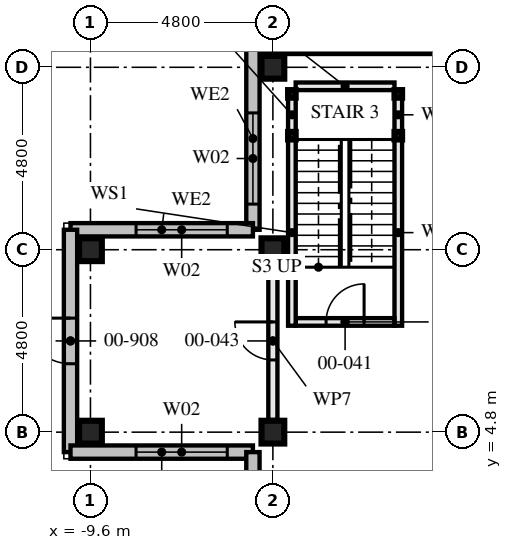
"""IFC4 building model, lengths in metres.
Left out: names, types, materials, properties, quantities, classifications, styles, units other than length and angle.
Written with IfcOpenShell. Run it as: python <this file> out.ifc"""

import sys

from ifc_helpers import new_model, si_unit, direction, frame, frame_2d, origin, origin_2d, place, context, subcontext, project, spatial, rectangle, hollow_rectangle, extrude, element, fill, save


model = new_model("IFC4")
c1 = context("Model", 3, precision=1e-05, world=origin(), true_north=direction((0.0, 1.0)))
c2 = subcontext(c1, "Body", "Model", "MODEL_VIEW")
j1 = project(units=[si_unit("LENGTHUNIT", "METRE"), si_unit("PLANEANGLEUNIT", "RADIAN")], contexts=[c1])
p1 = place(None, origin())
s1 = spatial("IfcSite", under=j1, at=p1, CompositionType="ELEMENT")
p2 = place(p1, origin())
s2 = spatial("IfcBuilding", under=s1, at=p2, CompositionType="ELEMENT")
p3 = place(p2, origin())
s3 = spatial("IfcBuildingStorey", under=s2, at=p3, CompositionType="ELEMENT", Elevation=0.0)
for number, where, z_axis, x_axis in (
    (1, (-9.6, 4.8, 0.0), (0.0, 0.0, 1.0), (0.0, 1.0, 0.0)),
    (2, (-9.6, 9.6, 0.0), (0.0, 0.0, 1.0), (0.0, 1.0, 0.0)),
    (3, (-4.8, 4.8, 0.0), (0.0, 0.0, 1.0), (0.0, 1.0, 0.0)),
    (4, (-4.8, 9.6, 0.0), (0.0, 0.0, 1.0), (0.0, 1.0, 0.0)),
    (5, (-4.8, 14.4, 0.0), (0.0, 0.0, 1.0), (0.0, 1.0, 0.0)),
):
    element("IfcColumn", number, at=place(p3, frame(where, z_axis=z_axis, x_axis=x_axis)), inside=s3, PredefinedType="COLUMN", context=c2, shape_type="SweptSolid", body=[
        extrude(hollow_rectangle(XDim=0.6, YDim=0.6, WallThickness=0.05, at=origin_2d()), origin(), (0.0, 0.0, 1.0), 4.5),
    ])
for number, where, z_axis, x_axis in (
    (6, (-4.3, 13.7, 0.0), (0.0, 0.0, 1.0), (1.0, 0.0, 0.0)),
    (7, (-1.5, 13.7, 0.0), (0.0, 0.0, 1.0), (1.0, 0.0, 0.0)),
    (8, (-4.3, 12.6, 0.0), (0.0, 0.0, 1.0), (1.0, 0.0, 0.0)),
    (9, (-1.5, 12.6, 0.0), (0.0, 0.0, 1.0), (1.0, 0.0, 0.0)),
):
    element("IfcColumn", number, at=place(p3, frame(where, z_axis=z_axis, x_axis=x_axis)), inside=s3, PredefinedType="COLUMN", context=c2, shape_type="SweptSolid", body=[
        extrude(hollow_rectangle(XDim=0.2, YDim=0.2, WallThickness=0.008, at=origin_2d()), origin(), (0.0, 0.0, 1.0), 4.33),
    ])
p4 = place(p3, frame((-0.525, 14.925, 0.0), z_axis=(0.0, 0.0, 1.0), x_axis=(-1.0, 0.0, 0.0)))
e10 = element("IfcWall", 10, at=p4, inside=s3, PredefinedType="SOLIDWALL", context=c2, shape_type="SweptSolid", body=[
    extrude(rectangle(XDim=4.8, YDim=0.35, at=frame_2d((2.4, 0.0))), origin(), (0.0, 0.0, 1.0), 4.5),
])
p5 = place(p4, frame((0.675, 0.0, 0.9)))
e11 = element("IfcOpeningElement", 11, at=p5, cuts=e10, PredefinedType="OPENING", context=c2, shape_type="SweptSolid", body=[
    extrude(rectangle(XDim=2.4, YDim=2.4, at=frame_2d((1.2, 1.2))), frame((0.0, 0.186, 0.0), z_axis=(0.0, -1.0, 0.0), x_axis=(1.0, 0.0, 0.0)), (0.0, 0.0, 1.0), 0.371),
])
p6 = place(p3, frame((-5.325, 14.925, 0.0), z_axis=(0.0, 0.0, 1.0), x_axis=(0.0, -1.0, 0.0)))
e12 = element("IfcWall", 12, at=p6, inside=s3, PredefinedType="SOLIDWALL", context=c2, shape_type="SweptSolid", body=[
    extrude(rectangle(XDim=4.8, YDim=0.35, at=frame_2d((2.4, 0.0))), origin(), (0.0, 0.0, 1.0), 4.5),
])
p7 = place(p6, frame((1.725, 0.0, 0.9)))
e13 = element("IfcOpeningElement", 13, at=p7, cuts=e12, PredefinedType="OPENING", context=c2, shape_type="SweptSolid", body=[
    extrude(rectangle(XDim=2.4, YDim=2.4, at=frame_2d((1.2, 1.2))), frame((0.0, 0.186, 0.0), z_axis=(0.0, -1.0, 0.0), x_axis=(1.0, 0.0, 0.0)), (0.0, 0.0, 1.0), 0.371),
])
p8 = place(p3, frame((-5.325, 10.125, 0.0), z_axis=(0.0, 0.0, 1.0), x_axis=(-1.0, 0.0, 0.0)))
e14 = element("IfcWall", 14, at=p8, inside=s3, PredefinedType="SOLIDWALL", context=c2, shape_type="SweptSolid", body=[
    extrude(rectangle(XDim=4.8, YDim=0.35, at=frame_2d((2.4, 0.0))), origin(), (0.0, 0.0, 1.0), 4.5),
])
p9 = place(p8, frame((0.675, 0.0, 0.9)))
e15 = element("IfcOpeningElement", 15, at=p9, cuts=e14, PredefinedType="OPENING", context=c2, shape_type="SweptSolid", body=[
    extrude(rectangle(XDim=2.4, YDim=2.4, at=frame_2d((1.2, 1.2))), frame((0.0, 0.186, 0.0), z_axis=(0.0, -1.0, 0.0), x_axis=(1.0, 0.0, 0.0)), (0.0, 0.0, 1.0), 0.371),
])
p10 = place(p3, frame((-10.125, 10.125, 0.0), z_axis=(0.0, 0.0, 1.0), x_axis=(0.0, -1.0, 0.0)))
e16 = element("IfcWall", 16, at=p10, inside=s3, PredefinedType="SOLIDWALL", context=c2, shape_type="SweptSolid", body=[
    extrude(rectangle(XDim=5.85, YDim=0.35, at=frame_2d((2.925, 0.0))), origin(), (0.0, 0.0, 1.0), 4.5),
])
p11 = place(p10, frame((2.325, 0.0, 0.0)))
e17 = element("IfcOpeningElement", 17, at=p11, cuts=e16, PredefinedType="OPENING", context=c2, shape_type="SweptSolid", body=[
    extrude(rectangle(XDim=1.2, YDim=2.4, at=frame_2d((0.6, 1.2))), frame((0.0, 0.186, 0.0), z_axis=(0.0, -1.0, 0.0), x_axis=(1.0, 0.0, 0.0)), (0.0, 0.0, 1.0), 0.371),
])
p12 = place(p3, frame((-10.125, 4.275, 0.0), z_axis=(0.0, 0.0, 1.0), x_axis=(1.0, 0.0, 0.0)))
e18 = element("IfcWall", 18, at=p12, inside=s3, PredefinedType="SOLIDWALL", context=c2, shape_type="SweptSolid", body=[
    extrude(rectangle(XDim=4.8, YDim=0.35, at=frame_2d((2.4, 0.0))), origin(), (0.0, 0.0, 1.0), 4.5),
])
p13 = place(p12, frame((1.725, 0.0, 0.9)))
e19 = element("IfcOpeningElement", 19, at=p13, cuts=e18, PredefinedType="OPENING", context=c2, shape_type="SweptSolid", body=[
    extrude(rectangle(XDim=2.4, YDim=2.4, at=frame_2d((1.2, 1.2))), frame((0.0, 0.186, 0.0), z_axis=(0.0, -1.0, 0.0), x_axis=(1.0, 0.0, 0.0)), (0.0, 0.0, 1.0), 0.371),
])
p14 = place(p3, frame((-5.325, 4.275, 0.0), z_axis=(0.0, 0.0, 1.0), x_axis=(0.0, -1.0, 0.0)))
e20 = element("IfcWall", 20, at=p14, inside=s3, PredefinedType="SOLIDWALL", context=c2, shape_type="SweptSolid", body=[
    extrude(rectangle(XDim=4.8, YDim=0.35, at=frame_2d((2.4, 0.0))), origin(), (0.0, 0.0, 1.0), 4.5),
])
p15 = place(p14, frame((0.675, 0.0, 0.9)))
e21 = element("IfcOpeningElement", 21, at=p15, cuts=e20, PredefinedType="OPENING", context=c2, shape_type="SweptSolid", body=[
    extrude(rectangle(XDim=2.4, YDim=2.4, at=frame_2d((1.2, 1.2))), frame((0.0, 0.186, 0.0), z_axis=(0.0, -1.0, 0.0), x_axis=(1.0, 0.0, 0.0)), (0.0, 0.0, 1.0), 0.371),
])
p16 = place(p3, frame((-4.3, 13.6, 0.0), z_axis=(0.0, 0.0, 1.0), x_axis=(0.0, -1.0, 0.0)))
e22 = element("IfcWall", 22, at=p16, inside=s3, PredefinedType="SOLIDWALL", context=c2, shape_type="SweptSolid", body=[
    extrude(rectangle(XDim=0.9, YDim=0.2, at=frame_2d((0.45, 0.0))), origin(), (0.0, 0.0, 1.0), 3.99),
])
p17 = place(p3, frame((-4.3, 12.5, 0.0), z_axis=(0.0, 0.0, 1.0), x_axis=(0.0, -1.0, 0.0)))
e23 = element("IfcWall", 23, at=p17, inside=s3, PredefinedType="SOLIDWALL", context=c2, shape_type="SweptSolid", body=[
    extrude(rectangle(XDim=4.9, YDim=0.2, at=frame_2d((2.45, 0.0))), origin(), (0.0, 0.0, 1.0), 3.99),
])
p18 = place(p3, frame((-1.5, 13.6, 0.0), z_axis=(0.0, 0.0, 1.0), x_axis=(0.0, -1.0, 0.0)))
e24 = element("IfcWall", 24, at=p18, inside=s3, PredefinedType="SOLIDWALL", context=c2, shape_type="SweptSolid", body=[
    extrude(rectangle(XDim=0.9, YDim=0.2, at=frame_2d((0.45, 0.0))), origin(), (0.0, 0.0, 1.0), 3.99),
])
p19 = place(p3, frame((-1.5, 12.5, 0.0), z_axis=(0.0, 0.0, 1.0), x_axis=(0.0, -1.0, 0.0)))
e25 = element("IfcWall", 25, at=p19, inside=s3, PredefinedType="SOLIDWALL", context=c2, shape_type="SweptSolid", body=[
    extrude(rectangle(XDim=4.9, YDim=0.2, at=frame_2d((2.45, 0.0))), origin(), (0.0, 0.0, 1.0), 3.99),
])
p20 = place(p3, frame((-4.2, 13.9, 0.0), z_axis=(0.0, 0.0, 1.0), x_axis=(1.0, 0.0, 0.0)))
e26 = element("IfcWall", 26, at=p20, inside=s3, PredefinedType="SOLIDWALL", context=c2, shape_type="SweptSolid", body=[
    extrude(rectangle(XDim=2.6, YDim=0.2, at=frame_2d((1.3, 0.0))), origin(), (0.0, 0.0, 1.0), 4.33),
])
p21 = place(p3, frame((-4.2, 7.7, 0.0), z_axis=(0.0, 0.0, 1.0), x_axis=(1.0, 0.0, 0.0)))
e27 = element("IfcWall", 27, at=p21, inside=s3, PredefinedType="SOLIDWALL", context=c2, shape_type="SweptSolid", body=[
    extrude(rectangle(XDim=2.6, YDim=0.2, at=frame_2d((1.3, 0.0))), origin(), (0.0, 0.0, 1.0), 4.33),
])
p22 = place(p21, frame((0.8, 0.0, 0.0)))
e28 = element("IfcOpeningElement", 28, at=p22, cuts=e27, PredefinedType="OPENING", context=c2, shape_type="SweptSolid", body=[
    extrude(rectangle(XDim=1.0, YDim=2.1, at=frame_2d((0.5, 1.05))), frame((0.0, 0.111, 0.0), z_axis=(0.0, -1.0, 0.0), x_axis=(1.0, 0.0, 0.0)), (0.0, 0.0, 1.0), 0.221),
])
p23 = place(p3, frame((-4.8, 5.12, 0.0), z_axis=(0.0, 0.0, 1.0), x_axis=(0.0, 1.0, 0.0)))
e29 = element("IfcWall", 29, at=p23, inside=s3, PredefinedType="SOLIDWALL", context=c2, shape_type="SweptSolid", body=[
    extrude(rectangle(XDim=4.16, YDim=0.24, at=frame_2d((2.08, 0.0))), origin(), (0.0, 0.0, 1.0), 3.55),
])
p24 = place(p23, frame((1.58, 0.0, 0.0)))
e30 = element("IfcOpeningElement", 30, at=p24, cuts=e29, PredefinedType="OPENING", context=c2, shape_type="SweptSolid", body=[
    extrude(rectangle(XDim=1.0, YDim=2.1, at=frame_2d((0.5, 1.05))), frame((0.0, 0.131, 0.0), z_axis=(0.0, -1.0, 0.0), x_axis=(1.0, 0.0, 0.0)), (0.0, 0.0, 1.0), 0.261),
])
p25 = place(p7, origin())
e31 = element("IfcWindow", 31, at=p25, inside=s3, PartitioningType="SINGLE_PANEL", PredefinedType="WINDOW", context=c2, shape_type="SweptSolid", body=[
    extrude(rectangle(XDim=2.4, YDim=2.4, at=frame_2d((1.2, 1.2))), frame((0.0, 0.03, 0.0), z_axis=(0.0, -1.0, 0.0), x_axis=(1.0, 0.0, 0.0)), (0.0, 0.0, 1.0), 0.06),
])
fill(e13, e31)
p26 = place(p9, origin())
e32 = element("IfcWindow", 32, at=p26, inside=s3, PartitioningType="SINGLE_PANEL", PredefinedType="WINDOW", context=c2, shape_type="SweptSolid", body=[
    extrude(rectangle(XDim=2.4, YDim=2.4, at=frame_2d((1.2, 1.2))), frame((0.0, 0.03, 0.0), z_axis=(0.0, -1.0, 0.0), x_axis=(1.0, 0.0, 0.0)), (0.0, 0.0, 1.0), 0.06),
])
fill(e15, e32)
p27 = place(p11, frame((1.2, 0.0, 0.0), z_axis=(0.0, 0.0, 1.0), x_axis=(-1.0, 0.0, 0.0)))
e33 = element("IfcDoor", 33, at=p27, inside=s3, OperationType="SINGLE_SWING_LEFT", PredefinedType="DOOR", context=c2, shape_type="SweptSolid", body=[
    extrude(rectangle(XDim=1.2, YDim=2.4, at=frame_2d((0.6, 1.2))), frame((0.0, 0.027, 0.0), z_axis=(0.0, -1.0, 0.0), x_axis=(1.0, 0.0, 0.0)), (0.0, 0.0, 1.0), 0.054),
])
fill(e17, e33)
p28 = place(p13, origin())
e34 = element("IfcWindow", 34, at=p28, inside=s3, PartitioningType="SINGLE_PANEL", PredefinedType="WINDOW", context=c2, shape_type="SweptSolid", body=[
    extrude(rectangle(XDim=2.4, YDim=2.4, at=frame_2d((1.2, 1.2))), frame((0.0, 0.03, 0.0), z_axis=(0.0, -1.0, 0.0), x_axis=(1.0, 0.0, 0.0)), (0.0, 0.0, 1.0), 0.06),
])
fill(e19, e34)
p29 = place(p22, origin())
e35 = element("IfcDoor", 35, at=p29, inside=s3, OperationType="SINGLE_SWING_LEFT", PredefinedType="DOOR", context=c2, shape_type="SweptSolid", body=[
    extrude(rectangle(XDim=1.0, YDim=2.1, at=frame_2d((0.5, 1.05))), frame((0.0, 0.032, 0.0), z_axis=(0.0, -1.0, 0.0), x_axis=(1.0, 0.0, 0.0)), (0.0, 0.0, 1.0), 0.064),
])
fill(e28, e35)
p30 = place(p24, origin())
e36 = element("IfcDoor", 36, at=p30, inside=s3, OperationType="SINGLE_SWING_LEFT", PredefinedType="DOOR", context=c2, shape_type="SweptSolid", body=[
    extrude(rectangle(XDim=1.0, YDim=2.1, at=frame_2d((0.5, 1.05))), frame((0.0, 0.032, 0.0), z_axis=(0.0, -1.0, 0.0), x_axis=(1.0, 0.0, 0.0)), (0.0, 0.0, 1.0), 0.064),
])
fill(e30, e36)
save(model, sys.argv[1])
